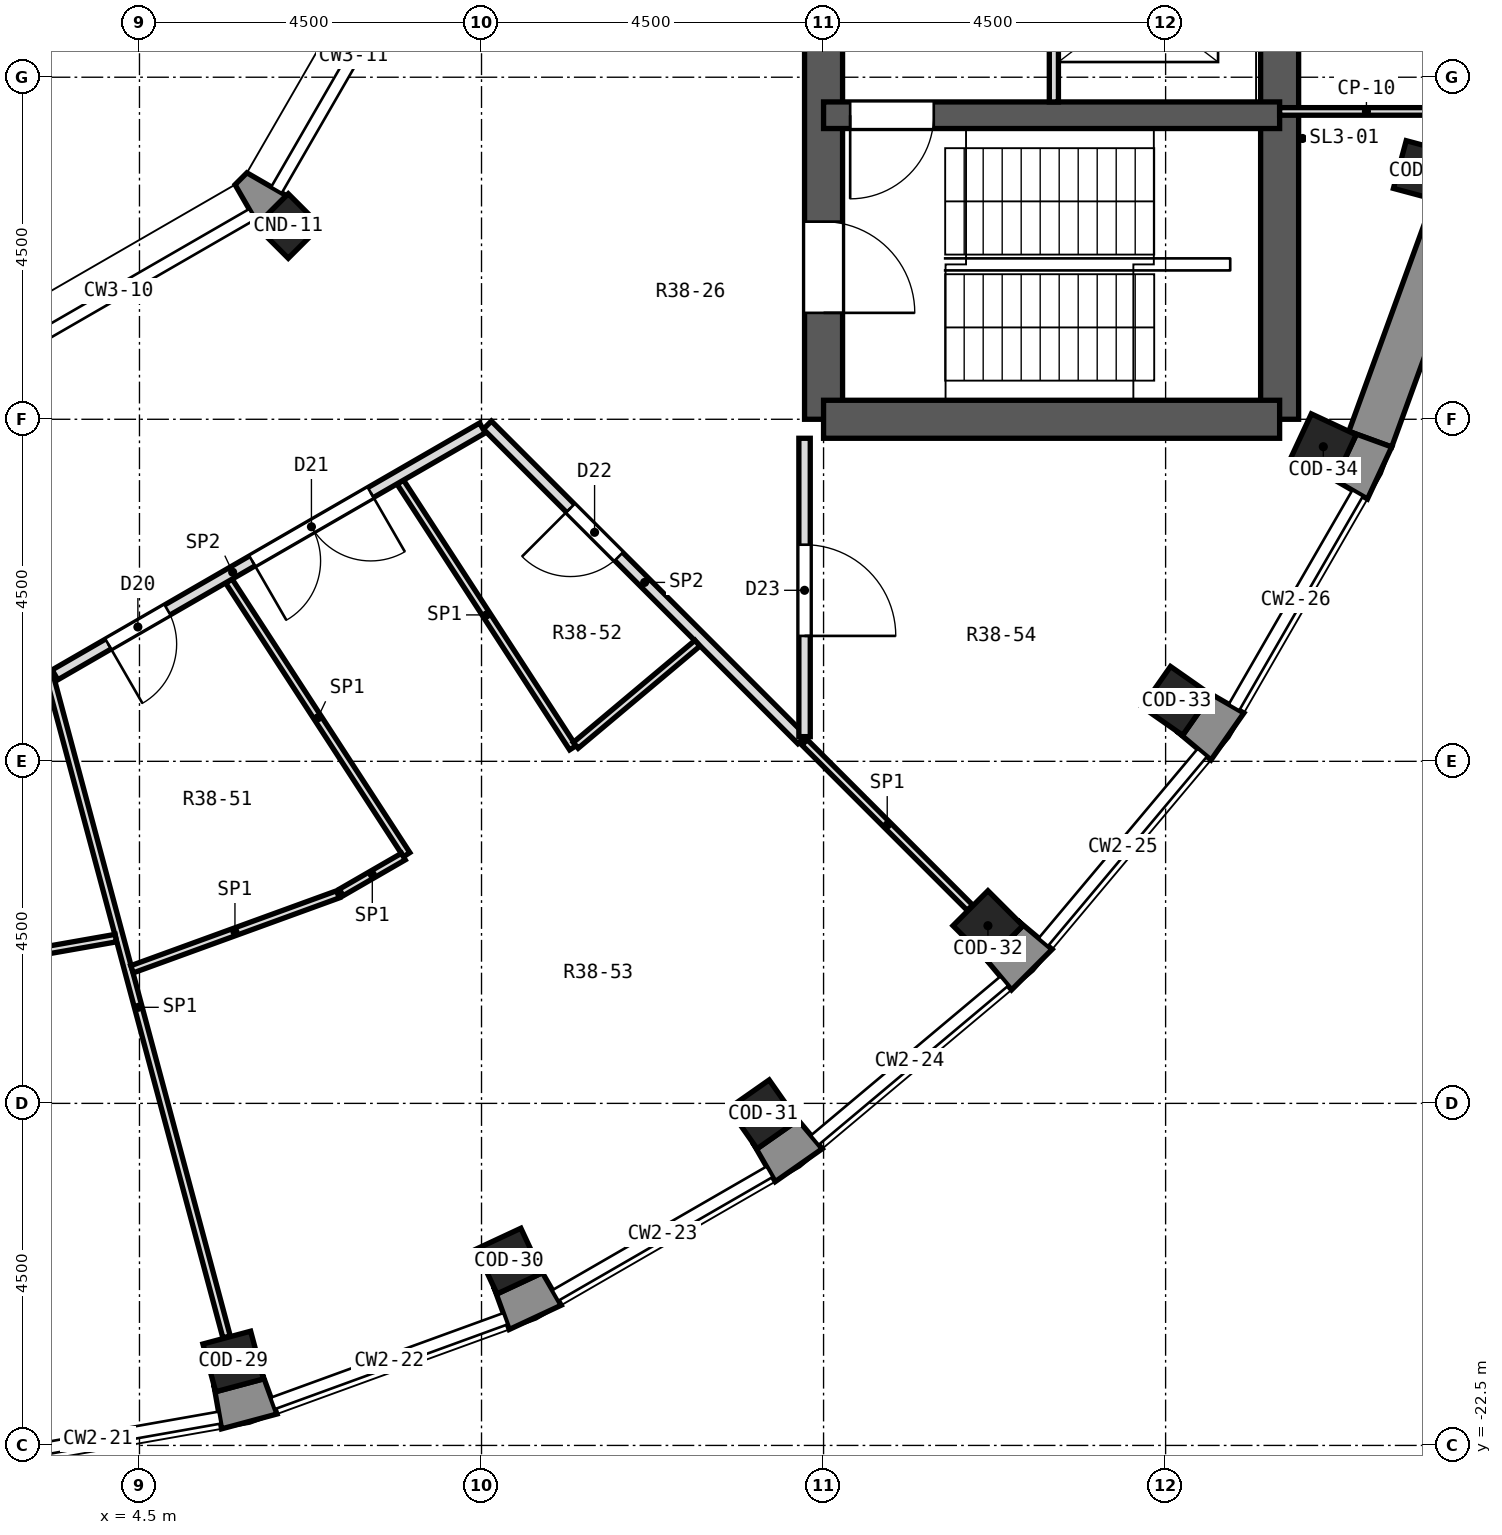
"""IFC4 building model, lengths in metres.
Left out: names, types, materials, properties, quantities, classifications, styles, units other than length and angle.
Written with IfcOpenShell. Run it as: python <this file> out.ifc"""

import sys

from ifc_helpers import new_model, si_unit, direction, frame, frame_2d, origin, origin_2d, place, context, subcontext, project, spatial, polyline, rectangle, outline, extrude, element, fill, save


model = new_model("IFC4")
c1 = context("Model", 3, precision=1e-05, world=origin(), true_north=direction((0.0, 1.0)))
c2 = subcontext(c1, "Body", "Model", "MODEL_VIEW")
j1 = project(units=[si_unit("LENGTHUNIT", "METRE"), si_unit("PLANEANGLEUNIT", "RADIAN")], contexts=[c1])
p1 = place(None, origin())
s1 = spatial("IfcSite", under=j1, at=p1, CompositionType="ELEMENT")
p2 = place(p1, origin())
s2 = spatial("IfcBuilding", under=s1, at=p2, CompositionType="ELEMENT")
p3 = place(p2, frame((0.0, 0.0, 279.2)))
s3 = spatial("IfcBuildingStorey", under=s2, at=p3, CompositionType="ELEMENT", Elevation=279.2)
for number, where, z_axis, x_axis in (
    (1, (5.733, -21.395, 0.0), (0.0, 0.0, 1.0), (0.259, -0.966, 0.0)),
    (2, (9.361, -20.075, 0.0), (0.0, 0.0, 1.0), (0.423, -0.906, 0.0)),
    (3, (12.705, -18.144, 0.0), (0.0, 0.0, 1.0), (0.574, -0.819, 0.0)),
    (4, (15.662, -15.662, 0.0), (0.0, 0.0, 1.0), (0.707, -0.707, 0.0)),
    (5, (18.144, -12.705, 0.0), (0.0, 0.0, 1.0), (0.819, -0.574, 0.0)),
    (6, (20.075, -9.361, 0.0), (0.0, 0.0, 1.0), (0.906, -0.423, 0.0)),
    (7, (21.395, -5.733, 0.0), (0.0, 0.0, 1.0), (0.966, -0.259, 0.0)),
):
    element("IfcColumn", number, at=place(p3, frame(where, z_axis=z_axis, x_axis=x_axis)), inside=s3, PredefinedType="COLUMN", context=c2, shape_type="SweptSolid", body=[
        extrude(rectangle(XDim=0.65, YDim=0.65, at=origin_2d()), origin(), (0.0, 0.0, 1.0), 5.0),
    ])
p4 = place(p3, frame((6.458, -6.458, 0.0), z_axis=(0.0, 0.0, 1.0), x_axis=(0.707106781187, -0.707106781187, 0.0)))
e8 = element("IfcColumn", 8, at=p4, inside=s3, PredefinedType="COLUMN", context=c2, shape_type="SweptSolid", body=[
    extrude(rectangle(XDim=0.6, YDim=0.6, at=origin_2d()), origin(), (0.0, 0.0, 1.0), 5.0),
])
p5 = place(p3, frame((13.5, -9.0, 0.0), z_axis=(0.0, 0.0, 1.0), x_axis=(0.0, 1.0, 0.0)))
e9 = element("IfcWall", 9, at=p5, inside=s3, PredefinedType="SHEAR", context=c2, shape_type="SweptSolid", body=[
    extrude(rectangle(XDim=18.0, YDim=0.5, at=frame_2d((9.0, 0.0))), origin(), (0.0, 0.0, 1.0), 5.0),
])
p6 = place(p5, frame((15.4, 0.0, 0.0)))
e10 = element("IfcOpeningElement", 10, at=p6, cuts=e9, PredefinedType="OPENING", context=c2, shape_type="SweptSolid", body=[
    extrude(rectangle(XDim=1.2, YDim=2.1, at=frame_2d((0.6, 1.05))), frame((0.0, 0.262, 0.0), z_axis=(0.0, -1.0, 0.0), x_axis=(1.0, 0.0, 0.0)), (0.0, 0.0, 1.0), 0.524),
])
p7 = place(p5, frame((1.4, 0.0, 0.0)))
e11 = element("IfcOpeningElement", 11, at=p7, cuts=e9, PredefinedType="OPENING", context=c2, shape_type="SweptSolid", body=[
    extrude(rectangle(XDim=1.2, YDim=2.1, at=frame_2d((0.6, 1.05))), frame((0.0, 0.262, 0.0), z_axis=(0.0, -1.0, 0.0), x_axis=(1.0, 0.0, 0.0)), (0.0, 0.0, 1.0), 0.524),
])
p8 = place(p5, frame((7.5, 0.0, 0.0)))
e12 = element("IfcOpeningElement", 12, at=p8, cuts=e9, PredefinedType="OPENING", context=c2, shape_type="SweptSolid", body=[
    extrude(rectangle(XDim=3.0, YDim=2.4, at=frame_2d((1.5, 1.2))), frame((0.0, 0.262, 0.0), z_axis=(0.0, -1.0, 0.0), x_axis=(1.0, 0.0, 0.0)), (0.0, 0.0, 1.0), 0.524),
])
p9 = place(p3, frame((19.5, -9.0, 0.0), z_axis=(0.0, 0.0, 1.0), x_axis=(0.0, 1.0, 0.0)))
e13 = element("IfcWall", 13, at=p9, inside=s3, PredefinedType="SHEAR", context=c2, shape_type="SweptSolid", body=[
    extrude(rectangle(XDim=18.0, YDim=0.5, at=frame_2d((9.0, 0.0))), origin(), (0.0, 0.0, 1.0), 5.0),
])
p10 = place(p9, frame((9.45, 0.0, 0.0)))
e14 = element("IfcOpeningElement", 14, at=p10, cuts=e13, PredefinedType="OPENING", context=c2, shape_type="SweptSolid", body=[
    extrude(rectangle(XDim=0.9, YDim=2.1, at=frame_2d((0.45, 1.05))), frame((0.0, 0.262, 0.0), z_axis=(0.0, -1.0, 0.0), x_axis=(1.0, 0.0, 0.0)), (0.0, 0.0, 1.0), 0.524),
])
p11 = place(p9, frame((7.65, 0.0, 0.0)))
e15 = element("IfcOpeningElement", 15, at=p11, cuts=e13, PredefinedType="OPENING", context=c2, shape_type="SweptSolid", body=[
    extrude(rectangle(XDim=0.9, YDim=2.1, at=frame_2d((0.45, 1.05))), frame((0.0, 0.262, 0.0), z_axis=(0.0, -1.0, 0.0), x_axis=(1.0, 0.0, 0.0)), (0.0, 0.0, 1.0), 0.524),
])
p12 = place(p3, frame((13.5, -9.0, 0.0), z_axis=(0.0, 0.0, 1.0), x_axis=(1.0, 0.0, 0.0)))
e16 = element("IfcWall", 16, at=p12, inside=s3, PredefinedType="SHEAR", context=c2, shape_type="SweptSolid", body=[
    extrude(rectangle(XDim=6.0, YDim=0.5, at=frame_2d((3.0, 0.0))), origin(), (0.0, 0.0, 1.0), 5.0),
])
p13 = place(p3, frame((13.5, -5.0, 0.0), z_axis=(0.0, 0.0, 1.0), x_axis=(1.0, 0.0, 0.0)))
e17 = element("IfcWall", 17, at=p13, inside=s3, PredefinedType="SHEAR", context=c2, shape_type="SweptSolid", body=[
    extrude(rectangle(XDim=6.0, YDim=0.35, at=frame_2d((3.0, 0.0))), origin(), (0.0, 0.0, 1.0), 5.0),
])
p14 = place(p13, frame((0.35, 0.0, 0.0)))
e18 = element("IfcOpeningElement", 18, at=p14, cuts=e17, PredefinedType="OPENING", context=c2, shape_type="SweptSolid", body=[
    extrude(rectangle(XDim=1.1, YDim=2.1, at=frame_2d((0.55, 1.05))), frame((0.0, 0.187, 0.0), z_axis=(0.0, -1.0, 0.0), x_axis=(1.0, 0.0, 0.0)), (0.0, 0.0, 1.0), 0.374),
])
p15 = place(p3, frame((20.693, -9.262, 0.0), z_axis=(0.0, 0.0, 1.0), x_axis=(0.342056509473, 0.939679383794, 0.0)))
e19 = element("IfcWall", 19, at=p15, inside=s3, PredefinedType="SOLIDWALL", context=c2, shape_type="SweptSolid", body=[
    extrude(rectangle(XDim=3.252, YDim=0.6, at=frame_2d((1.626, 0.0))), origin(), (0.0, 0.0, 1.0), 4.45),
])
p16 = place(p3, origin())
e20 = element("IfcWall", 20, at=p16, inside=s3, PredefinedType="SOLIDWALL", context=c2, shape_type="SweptSolid", body=[
    extrude(outline(polyline([(6.309, -22.087), (6.104, -21.523), (6.131, -21.625), (5.503, -21.793), (5.476, -21.691), (5.58, -22.282), (6.309, -22.087)])), origin(), (0.0, 0.0, 1.0), 4.45),
])
p17 = place(p3, origin())
e21 = element("IfcWall", 21, at=p17, inside=s3, PredefinedType="SOLIDWALL", context=c2, shape_type="SweptSolid", body=[
    extrude(outline(polyline([(9.364, -20.975), (10.048, -20.656), (9.748, -20.136), (9.793, -20.232), (9.204, -20.507), (9.159, -20.411), (9.364, -20.975)])), origin(), (0.0, 0.0, 1.0), 4.45),
])
p18 = place(p3, origin())
e22 = element("IfcWall", 22, at=p18, inside=s3, PredefinedType="SOLIDWALL", context=c2, shape_type="SweptSolid", body=[
    extrude(outline(polyline([(12.864, -19.03), (13.482, -18.597), (13.097, -18.137), (13.157, -18.224), (12.625, -18.597), (12.564, -18.51), (12.864, -19.03)])), origin(), (0.0, 0.0, 1.0), 4.45),
])
p19 = place(p3, origin())
e23 = element("IfcWall", 23, at=p19, inside=s3, PredefinedType="SOLIDWALL", context=c2, shape_type="SweptSolid", body=[
    extrude(outline(polyline([(16.507, -15.973), (16.047, -15.588), (16.122, -15.662), (15.662, -16.122), (15.588, -16.047), (15.973, -16.507), (16.507, -15.973)])), origin(), (0.0, 0.0, 1.0), 4.45),
])
p20 = place(p3, origin())
e24 = element("IfcWall", 24, at=p20, inside=s3, PredefinedType="SOLIDWALL", context=c2, shape_type="SweptSolid", body=[
    extrude(outline(polyline([(19.03, -12.864), (18.51, -12.564), (18.597, -12.625), (18.224, -13.157), (18.137, -13.097), (18.597, -13.482), (19.03, -12.864)])), origin(), (0.0, 0.0, 1.0), 4.45),
])
p21 = place(p3, origin())
e25 = element("IfcWall", 25, at=p21, inside=s3, PredefinedType="SOLIDWALL", context=c2, shape_type="SweptSolid", body=[
    extrude(outline(polyline([(20.656, -10.048), (20.975, -9.364), (20.411, -9.159), (20.507, -9.204), (20.232, -9.793), (20.136, -9.748), (20.656, -10.048)])), origin(), (0.0, 0.0, 1.0), 4.45),
])
p22 = place(p3, origin())
e26 = element("IfcWall", 26, at=p22, inside=s3, PredefinedType="SOLIDWALL", context=c2, shape_type="SweptSolid", body=[
    extrude(outline(polyline([(6.433, -6.058), (5.914, -5.758), (5.758, -5.914), (6.058, -6.433), (6.433, -6.058)])), origin(), (0.0, 0.0, 1.0), 4.45),
])
p23 = place(p3, frame((3.323, -12.4, 0.0), z_axis=(0.0, 0.0, 1.0), x_axis=(0.258728835498, -0.965949993365, 0.0)))
e27 = element("IfcWall", 27, at=p23, inside=s3, PredefinedType="PARTITIONING", context=c2, shape_type="SweptSolid", body=[
    extrude(rectangle(XDim=8.978, YDim=0.1, at=frame_2d((4.489, 0.0))), origin(), (0.0, 0.0, 1.0), 4.45),
])
p24 = place(p3, frame((5.676, -11.128, 0.0), z_axis=(0.0, 0.0, 1.0), x_axis=(0.544832434593, -0.838544941083, 0.0)))
e28 = element("IfcWall", 28, at=p24, inside=s3, PredefinedType="PARTITIONING", context=c2, shape_type="SweptSolid", body=[
    extrude(rectangle(XDim=4.293, YDim=0.1, at=frame_2d((2.146, 0.0))), origin(), (0.0, 0.0, 1.0), 4.45),
])
p25 = place(p3, frame((7.931, -9.826, 0.0), z_axis=(0.0, 0.0, 1.0), x_axis=(0.544576550515, -0.838711142545, 0.0)))
e29 = element("IfcWall", 29, at=p25, inside=s3, PredefinedType="PARTITIONING", context=c2, shape_type="SweptSolid", body=[
    extrude(rectangle(XDim=4.168, YDim=0.1, at=frame_2d((2.084, 0.0))), origin(), (0.0, 0.0, 1.0), 4.45),
])
p26 = place(p3, frame((13.25, -13.25, 0.0), z_axis=(0.0, 0.0, 1.0), x_axis=(0.707106781187, -0.707106781187, 0.0)))
e30 = element("IfcWall", 30, at=p26, inside=s3, PredefinedType="PARTITIONING", context=c2, shape_type="SweptSolid", body=[
    extrude(rectangle(XDim=3.077, YDim=0.1, at=frame_2d((1.538, 0.0))), origin(), (0.0, 0.0, 1.0), 4.45),
])
p27 = place(p3, frame((9.077, -9.077, 0.0), z_axis=(0.0, 0.0, 1.0), x_axis=(0.707106781187, -0.707106781187, 0.0)))
e31 = element("IfcWall", 31, at=p27, inside=s3, PredefinedType="PARTITIONING", context=c2, shape_type="SweptSolid", body=[
    extrude(rectangle(XDim=5.852, YDim=0.15, at=frame_2d((2.926, 0.0))), origin(), (0.0, 0.0, 1.0), 4.45),
])
p28 = place(p27, frame((1.545, 0.0, 0.0)))
e32 = element("IfcOpeningElement", 32, at=p28, cuts=e31, PredefinedType="OPENING", context=c2, shape_type="SweptSolid", body=[
    extrude(rectangle(XDim=0.9, YDim=2.1, at=frame_2d((0.45, 1.05))), frame((0.0, 0.087, 0.0), z_axis=(0.0, -1.0, 0.0), x_axis=(1.0, 0.0, 0.0)), (0.0, 0.0, 1.0), 0.174),
])
p29 = place(p3, frame((1.427, -16.312, 0.0), z_axis=(0.0, 0.0, 1.0), x_axis=(0.984846599315, 0.173427725056, 0.0)))
e33 = element("IfcWall", 33, at=p29, inside=s3, PredefinedType="PARTITIONING", context=c2, shape_type="SweptSolid", body=[
    extrude(rectangle(XDim=2.804, YDim=0.1, at=frame_2d((1.402, 0.0))), origin(), (0.0, 0.0, 1.0), 4.45),
])
p30 = place(p3, frame((4.402, -16.236, 0.0), z_axis=(0.0, 0.0, 1.0), x_axis=(0.939709324203, 0.341974247578, 0.0)))
e34 = element("IfcWall", 34, at=p30, inside=s3, PredefinedType="PARTITIONING", context=c2, shape_type="SweptSolid", body=[
    extrude(rectangle(XDim=2.883, YDim=0.1, at=frame_2d((1.441, 0.0))), origin(), (0.0, 0.0, 1.0), 4.45),
])
p31 = place(p3, frame((7.154, -15.225, 0.0), z_axis=(0.0, 0.0, 1.0), x_axis=(0.865909883235, 0.500200034103, 0.0)))
e35 = element("IfcWall", 35, at=p31, inside=s3, PredefinedType="PARTITIONING", context=c2, shape_type="SweptSolid", body=[
    extrude(rectangle(XDim=0.944, YDim=0.1, at=frame_2d((0.472, 0.0))), origin(), (0.0, 0.0, 1.0), 4.45),
])
p32 = place(p3, frame((3.388, -12.363, 0.0), z_axis=(0.0, 0.0, 1.0), x_axis=(0.865967095912, 0.5001009786, 0.0)))
e36 = element("IfcWall", 36, at=p32, inside=s3, PredefinedType="PARTITIONING", context=c2, shape_type="SweptSolid", body=[
    extrude(rectangle(XDim=6.495, YDim=0.15, at=frame_2d((3.248, 0.0))), origin(), (0.0, 0.0, 1.0), 4.45),
])
p33 = place(p32, frame((0.81, 0.0, 0.0)))
e37 = element("IfcOpeningElement", 37, at=p33, cuts=e36, PredefinedType="OPENING", context=c2, shape_type="SweptSolid", body=[
    extrude(rectangle(XDim=0.9, YDim=2.1, at=frame_2d((0.45, 1.05))), frame((0.0, 0.087, 0.0), z_axis=(0.0, -1.0, 0.0), x_axis=(1.0, 0.0, 0.0)), (0.0, 0.0, 1.0), 0.174),
])
p34 = place(p32, frame((2.997, 0.0, 0.0)))
e38 = element("IfcOpeningElement", 38, at=p34, cuts=e36, PredefinedType="OPENING", context=c2, shape_type="SweptSolid", body=[
    extrude(rectangle(XDim=1.8, YDim=2.1, at=frame_2d((0.9, 1.05))), frame((0.0, 0.087, 0.0), z_axis=(0.0, -1.0, 0.0), x_axis=(1.0, 0.0, 0.0)), (0.0, 0.0, 1.0), 0.174),
])
p35 = place(p3, frame((10.239, -13.29, 0.0), z_axis=(0.0, 0.0, 1.0), x_axis=(0.766082082368, 0.642742750308, 0.0)))
e39 = element("IfcWall", 39, at=p35, inside=s3, PredefinedType="PARTITIONING", context=c2, shape_type="SweptSolid", body=[
    extrude(rectangle(XDim=2.09, YDim=0.1, at=frame_2d((1.045, 0.0))), origin(), (0.0, 0.0, 1.0), 4.45),
])
p36 = place(p3, frame((13.25, -13.175, 0.0), z_axis=(0.0, 0.0, 1.0), x_axis=(0.0, 1.0, 0.0)))
e40 = element("IfcWall", 40, at=p36, inside=s3, PredefinedType="PARTITIONING", context=c2, shape_type="SweptSolid", body=[
    extrude(rectangle(XDim=3.925, YDim=0.15, at=frame_2d((1.962, 0.0))), origin(), (0.0, 0.0, 1.0), 4.45),
])
p37 = place(p36, frame((1.325, 0.0, 0.0)))
e41 = element("IfcOpeningElement", 41, at=p37, cuts=e40, PredefinedType="OPENING", context=c2, shape_type="SweptSolid", body=[
    extrude(rectangle(XDim=1.2, YDim=2.1, at=frame_2d((0.6, 1.05))), frame((0.0, 0.087, 0.0), z_axis=(0.0, -1.0, 0.0), x_axis=(1.0, 0.0, 0.0)), (0.0, 0.0, 1.0), 0.174),
])
p38 = place(p3, frame((19.5, -4.95, 0.0), z_axis=(0.0, 0.0, 1.0), x_axis=(1.0, 0.0, 0.0)))
e42 = element("IfcWall", 42, at=p38, inside=s3, PredefinedType="PARTITIONING", context=c2, shape_type="SweptSolid", body=[
    extrude(rectangle(XDim=2.284, YDim=0.1, at=frame_2d((1.142, 0.0))), origin(), (0.0, 0.0, 1.0), 4.45),
])
p39 = place(p3, frame((16.53, -4.825, 0.0), z_axis=(0.0, 0.0, 1.0), x_axis=(0.0, 1.0, 0.0)))
e43 = element("IfcWall", 43, at=p39, inside=s3, PredefinedType="PARTITIONING", context=c2, shape_type="SweptSolid", body=[
    extrude(rectangle(XDim=2.65, YDim=0.12, at=frame_2d((1.325, 0.0))), origin(), (0.0, 0.0, 1.0), 4.45),
])
p40 = place(p39, frame((0.775, 0.0, 0.0)))
e44 = element("IfcOpeningElement", 44, at=p40, cuts=e43, PredefinedType="OPENING", context=c2, shape_type="SweptSolid", body=[
    extrude(rectangle(XDim=1.1, YDim=2.1, at=frame_2d((0.55, 1.05))), frame((0.0, 0.072, 0.0), z_axis=(0.0, -1.0, 0.0), x_axis=(1.0, 0.0, 0.0)), (0.0, 0.0, 1.0), 0.144),
])
p41 = place(p33, frame((0.9, 0.0, 0.0), z_axis=(0.0, 0.0, 1.0), x_axis=(-1.0, 0.0, 0.0)))
e45 = element("IfcDoor", 45, at=p41, inside=s3, OperationType="SINGLE_SWING_RIGHT", PredefinedType="DOOR", context=c2, shape_type="SweptSolid", body=[
    extrude(rectangle(XDim=0.9, YDim=2.1, at=frame_2d((0.45, 1.05))), frame((0.0, 0.025, 0.0), z_axis=(0.0, -1.0, 0.0), x_axis=(1.0, 0.0, 0.0)), (0.0, 0.0, 1.0), 0.05),
])
fill(e37, e45)
p42 = place(p34, frame((1.8, 0.0, 0.0), z_axis=(0.0, 0.0, 1.0), x_axis=(-1.0, 0.0, 0.0)))
e46 = element("IfcDoor", 46, at=p42, inside=s3, OperationType="DOUBLE_DOOR_SINGLE_SWING", PredefinedType="DOOR", context=c2, shape_type="SweptSolid", body=[
    extrude(rectangle(XDim=1.8, YDim=2.1, at=frame_2d((0.9, 1.05))), frame((0.0, 0.025, 0.0), z_axis=(0.0, -1.0, 0.0), x_axis=(1.0, 0.0, 0.0)), (0.0, 0.0, 1.0), 0.05),
])
fill(e38, e46)
p43 = place(p28, frame((0.9, 0.0, 0.0), z_axis=(0.0, 0.0, 1.0), x_axis=(-1.0, 0.0, 0.0)))
e47 = element("IfcDoor", 47, at=p43, inside=s3, OperationType="SINGLE_SWING_RIGHT", PredefinedType="DOOR", context=c2, shape_type="SweptSolid", body=[
    extrude(rectangle(XDim=0.9, YDim=2.1, at=frame_2d((0.45, 1.05))), frame((0.0, 0.025, 0.0), z_axis=(0.0, -1.0, 0.0), x_axis=(1.0, 0.0, 0.0)), (0.0, 0.0, 1.0), 0.05),
])
fill(e32, e47)
p44 = place(p37, frame((1.2, 0.0, 0.0), z_axis=(0.0, 0.0, 1.0), x_axis=(-1.0, 0.0, 0.0)))
e48 = element("IfcDoor", 48, at=p44, inside=s3, OperationType="SINGLE_SWING_RIGHT", PredefinedType="DOOR", context=c2, shape_type="SweptSolid", body=[
    extrude(rectangle(XDim=1.2, YDim=2.1, at=frame_2d((0.6, 1.05))), frame((0.0, 0.025, 0.0), z_axis=(0.0, -1.0, 0.0), x_axis=(1.0, 0.0, 0.0)), (0.0, 0.0, 1.0), 0.05),
])
fill(e41, e48)
p45 = place(p14, frame((1.1, 0.0, 0.0), z_axis=(0.0, 0.0, 1.0), x_axis=(-1.0, 0.0, 0.0)))
e49 = element("IfcDoor", 49, at=p45, inside=s3, OperationType="SINGLE_SWING_RIGHT", PredefinedType="DOOR", context=c2, shape_type="SweptSolid", body=[
    extrude(rectangle(XDim=1.1, YDim=2.1, at=frame_2d((0.55, 1.05))), frame((0.0, 0.025, 0.0), z_axis=(0.0, -1.0, 0.0), x_axis=(1.0, 0.0, 0.0)), (0.0, 0.0, 1.0), 0.05),
])
fill(e18, e49)
p46 = place(p7, frame((1.2, 0.0, 0.0), z_axis=(0.0, 0.0, 1.0), x_axis=(-1.0, 0.0, 0.0)))
e50 = element("IfcDoor", 50, at=p46, inside=s3, OperationType="SINGLE_SWING_RIGHT", PredefinedType="DOOR", context=c2, shape_type="SweptSolid", body=[
    extrude(rectangle(XDim=1.2, YDim=2.1, at=frame_2d((0.6, 1.05))), frame((0.0, 0.025, 0.0), z_axis=(0.0, -1.0, 0.0), x_axis=(1.0, 0.0, 0.0)), (0.0, 0.0, 1.0), 0.05),
])
fill(e11, e50)
save(model, sys.argv[1])
